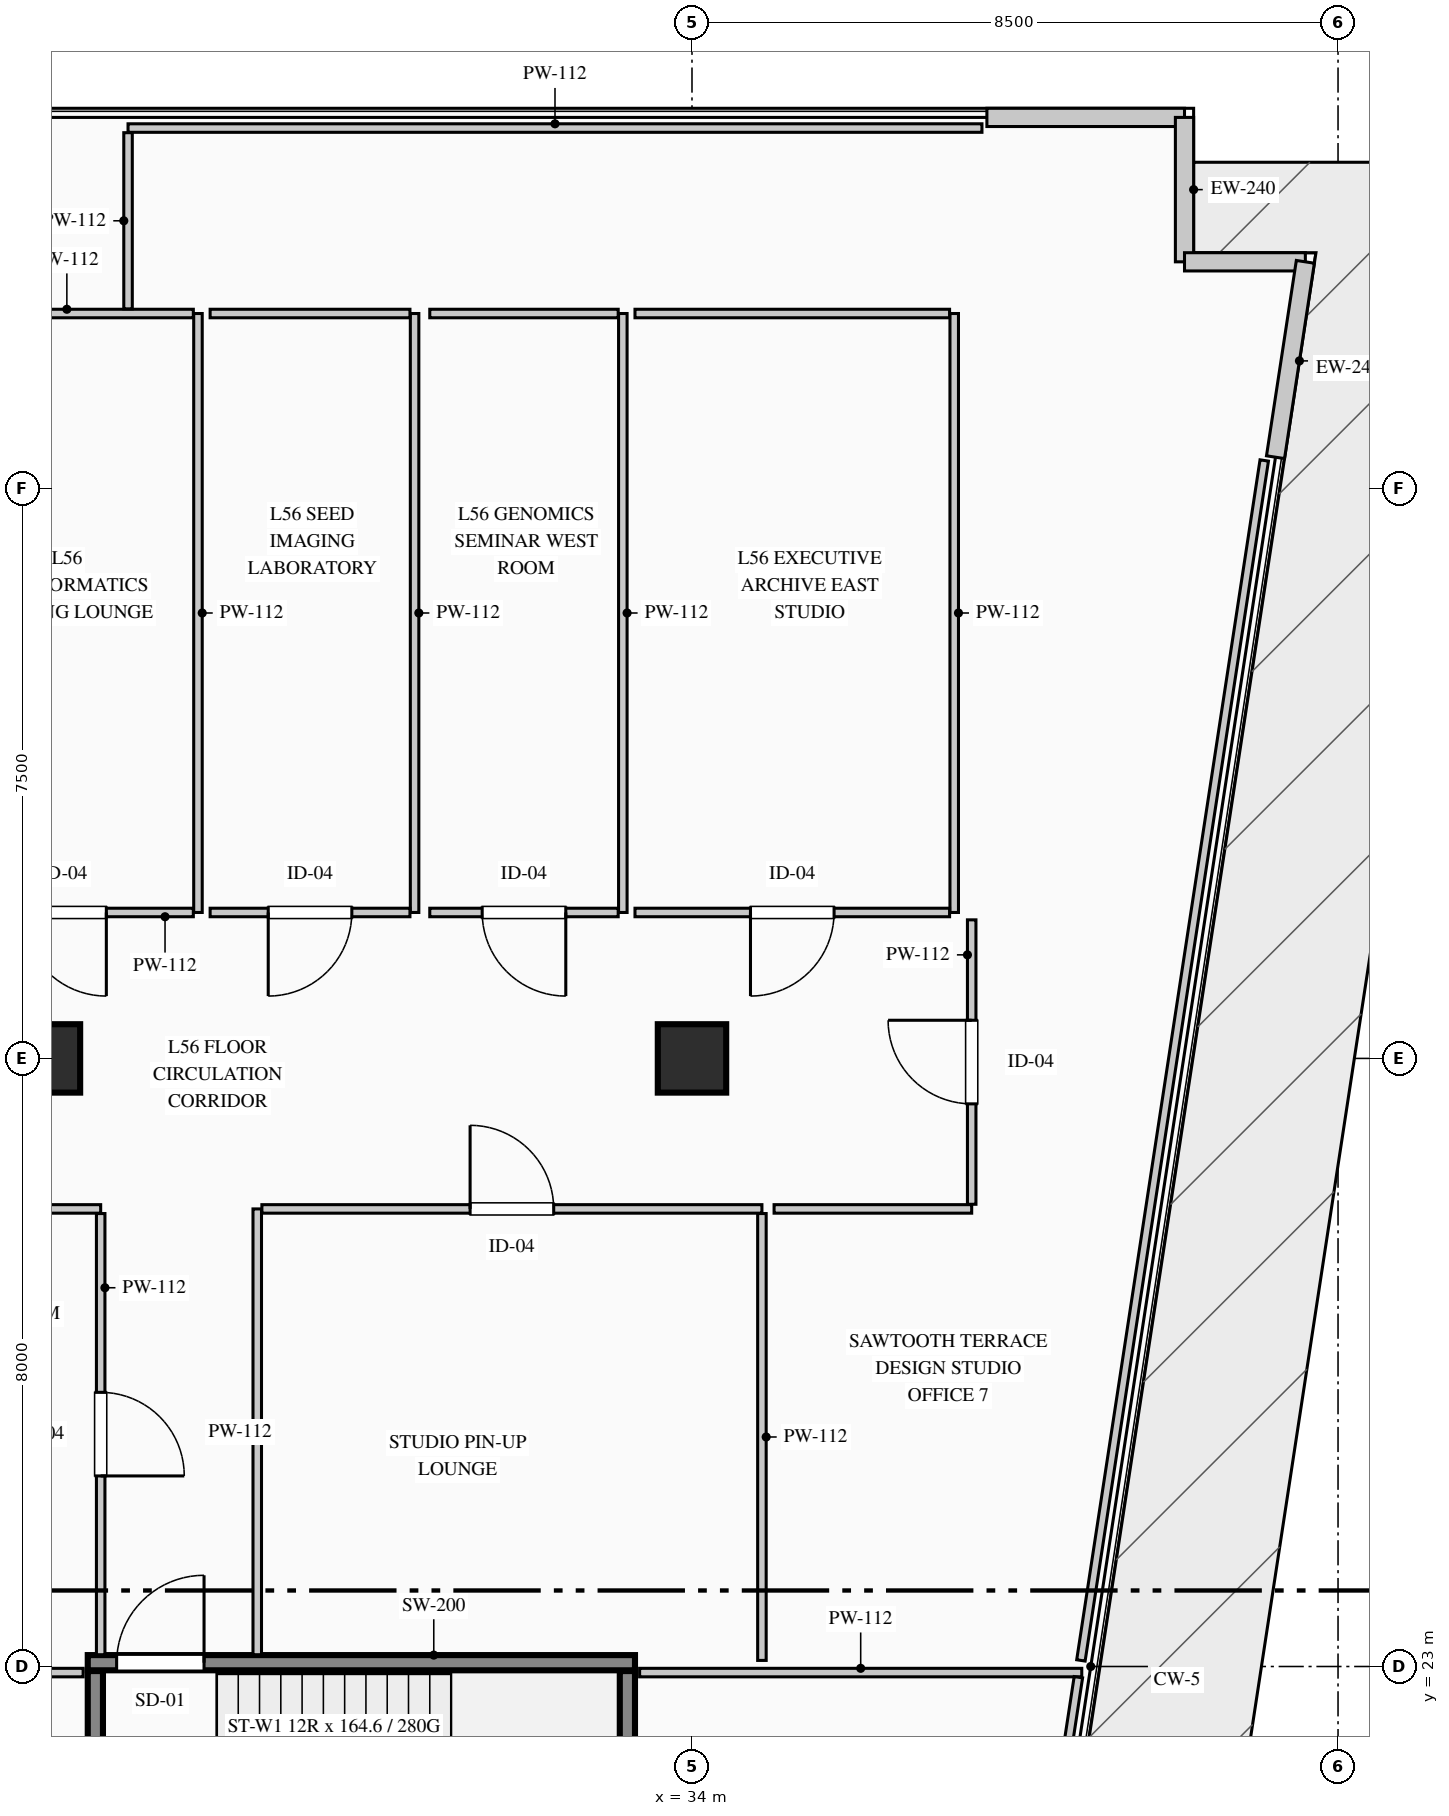
"""IFC4 building model, lengths in metres.
Left out: names, types, materials, properties, quantities, classifications, styles, units other than length and angle.
Written with IfcOpenShell. Run it as: python <this file> out.ifc"""

import sys

from ifc_helpers import new_model, si_unit, direction, frame, frame_2d, origin, origin_2d, place, context, subcontext, project, spatial, rectangle, extrude, element, fill, save


model = new_model("IFC4")
c1 = context("Model", 3, precision=1e-05, world=origin(), true_north=direction((0.0, 1.0)))
c2 = subcontext(c1, "Body", "Model", "MODEL_VIEW")
j1 = project(units=[si_unit("LENGTHUNIT", "METRE"), si_unit("PLANEANGLEUNIT", "RADIAN")], contexts=[c1])
p1 = place(None, origin())
s1 = spatial("IfcSite", under=j1, at=p1, CompositionType="ELEMENT")
p2 = place(p1, origin())
s2 = spatial("IfcBuilding", under=s1, at=p2, CompositionType="ELEMENT")
p3 = place(p2, frame((0.0, 0.0, 235.1)))
s3 = spatial("IfcBuildingStorey", under=s2, at=p3, CompositionType="ELEMENT", Elevation=235.1)
p4 = place(p3, frame((26.05, 23.05, 0.0), z_axis=(0.0, 0.0, 1.0), x_axis=(1.0, 0.0, 0.0)))
e1 = element("IfcWall", 1, at=p4, inside=s3, PredefinedType="SHEAR", context=c2, shape_type="SweptSolid", body=[
    extrude(rectangle(XDim=7.2, YDim=0.2, at=frame_2d((3.6, 0.0))), origin(), (0.0, 0.0, 1.0), 3.95),
])
p5 = place(p4, frame((0.38, 0.0, 0.0)))
e2 = element("IfcOpeningElement", 2, at=p5, cuts=e1, PredefinedType="OPENING", context=c2, shape_type="SweptSolid", body=[
    extrude(rectangle(XDim=1.15, YDim=2.2, at=frame_2d((0.575, 1.1))), frame((0.0, 0.11, 0.0), z_axis=(0.0, -1.0, 0.0), x_axis=(1.0, 0.0, 0.0)), (0.0, 0.0, 1.0), 0.22),
])
for number, where, z_axis, x_axis in (
    (3, (26.15, 19.81, 0.0), (0.0, 0.0, 1.0), (0.0, 1.0, 0.0)),
    (4, (33.15, 19.81, 0.0), (0.0, 0.0, 1.0), (0.0, 1.0, 0.0)),
):
    element("IfcWall", number, at=place(p3, frame(where, z_axis=z_axis, x_axis=x_axis)), inside=s3, PredefinedType="SHEAR", context=c2, shape_type="SweptSolid", body=[
        extrude(rectangle(XDim=3.13, YDim=0.2, at=frame_2d((1.565, 0.0))), origin(), (0.0, 0.0, 1.0), 3.95),
    ])
for number, where, z_axis, x_axis in (
    (5, (25.5, 31.0, 0.0), (0.0, 0.0, 1.0), (1.0, 0.0, 0.0)),
    (6, (34.0, 31.0, 0.0), (0.0, 0.0, 1.0), (1.0, 0.0, 0.0)),
):
    element("IfcColumn", number, at=place(p3, frame(where, z_axis=z_axis, x_axis=x_axis)), inside=s3, PredefinedType="COLUMN", context=c2, shape_type="SweptSolid", body=[
        extrude(rectangle(XDim=0.9, YDim=0.9, at=origin_2d()), origin(), (0.0, 0.0, 1.0), 3.95),
    ])
p6 = place(p3, frame((37.88, 43.38, 0.0), z_axis=(0.0, 0.0, 1.0), x_axis=(1.0, 0.0, 0.0)))
e7 = element("IfcWall", 7, at=p6, inside=s3, PredefinedType="STANDARD", context=c2, shape_type="SweptSolid", body=[
    extrude(rectangle(XDim=2.6, YDim=0.24, at=frame_2d((1.3, 0.0))), origin(), (0.0, 0.0, 1.0), 3.7),
])
p7 = place(p3, frame((40.48, 43.38, 0.0), z_axis=(0.0, 0.0, 1.0), x_axis=(0.0, -1.0, 0.0)))
e8 = element("IfcWall", 8, at=p7, inside=s3, PredefinedType="STANDARD", context=c2, shape_type="SweptSolid", body=[
    extrude(rectangle(XDim=1.9, YDim=0.24, at=frame_2d((0.95, 0.0))), origin(), (0.0, 0.0, 1.0), 3.7),
])
p8 = place(p3, frame((40.48, 41.48, 0.0), z_axis=(0.0, 0.0, 1.0), x_axis=(1.0, 0.0, 0.0)))
e9 = element("IfcWall", 9, at=p8, inside=s3, PredefinedType="STANDARD", context=c2, shape_type="SweptSolid", body=[
    extrude(rectangle(XDim=1.59, YDim=0.24, at=frame_2d((0.795, 0.0))), origin(), (0.0, 0.0, 1.0), 3.7),
])
p9 = place(p3, frame((42.07, 41.48, 0.0), z_axis=(0.0, 0.0, 1.0), x_axis=(-0.151090396132, -0.988519950328, 0.0)))
e10 = element("IfcWall", 10, at=p9, inside=s3, PredefinedType="STANDARD", context=c2, shape_type="SweptSolid", body=[
    extrude(rectangle(XDim=2.6, YDim=0.24, at=frame_2d((1.3, 0.0))), origin(), (0.0, 0.0, 1.0), 3.7),
])
p10 = place(p3, frame((27.5, 40.8, 0.0), z_axis=(0.0, 0.0, 1.0), x_axis=(0.0, -1.0, 0.0)))
e11 = element("IfcWall", 11, at=p10, inside=s3, PredefinedType="PARTITIONING", context=c2, shape_type="SweptSolid", body=[
    extrude(rectangle(XDim=7.88, YDim=0.112, at=frame_2d((3.94, 0.0))), origin(), (0.0, 0.0, 1.0), 3.7),
])
p11 = place(p3, frame((27.439, 32.92, 0.0), z_axis=(0.0, 0.0, 1.0), x_axis=(-1.0, 0.0, 0.0)))
e12 = element("IfcWall", 12, at=p11, inside=s3, PredefinedType="PARTITIONING", context=c2, shape_type="SweptSolid", body=[
    extrude(rectangle(XDim=3.389, YDim=0.112, at=frame_2d((1.694, 0.0))), origin(), (0.0, 0.0, 1.0), 3.7),
])
p12 = place(p11, frame((1.145, 0.0, 0.0)))
e13 = element("IfcOpeningElement", 13, at=p12, cuts=e12, PredefinedType="OPENING", context=c2, shape_type="SweptSolid", body=[
    extrude(rectangle(XDim=1.1, YDim=2.2, at=frame_2d((0.55, 1.1))), frame((0.0, 0.066, 0.0), z_axis=(0.0, -1.0, 0.0), x_axis=(1.0, 0.0, 0.0)), (0.0, 0.0, 1.0), 0.132),
])
p13 = place(p3, frame((24.111, 40.8, 0.0), z_axis=(0.0, 0.0, 1.0), x_axis=(1.0, 0.0, 0.0)))
e14 = element("IfcWall", 14, at=p13, inside=s3, PredefinedType="PARTITIONING", context=c2, shape_type="SweptSolid", body=[
    extrude(rectangle(XDim=3.328, YDim=0.112, at=frame_2d((1.664, 0.0))), origin(), (0.0, 0.0, 1.0), 3.7),
])
p14 = place(p3, frame((30.35, 40.8, 0.0), z_axis=(0.0, 0.0, 1.0), x_axis=(0.0, -1.0, 0.0)))
e15 = element("IfcWall", 15, at=p14, inside=s3, PredefinedType="PARTITIONING", context=c2, shape_type="SweptSolid", body=[
    extrude(rectangle(XDim=7.88, YDim=0.112, at=frame_2d((3.94, 0.0))), origin(), (0.0, 0.0, 1.0), 3.7),
])
p15 = place(p3, frame((30.289, 32.92, 0.0), z_axis=(0.0, 0.0, 1.0), x_axis=(-1.0, 0.0, 0.0)))
e16 = element("IfcWall", 16, at=p15, inside=s3, PredefinedType="PARTITIONING", context=c2, shape_type="SweptSolid", body=[
    extrude(rectangle(XDim=2.629, YDim=0.112, at=frame_2d((1.314, 0.0))), origin(), (0.0, 0.0, 1.0), 3.7),
])
p16 = place(p15, frame((0.764, 0.0, 0.0)))
e17 = element("IfcOpeningElement", 17, at=p16, cuts=e16, PredefinedType="OPENING", context=c2, shape_type="SweptSolid", body=[
    extrude(rectangle(XDim=1.1, YDim=2.2, at=frame_2d((0.55, 1.1))), frame((0.0, 0.066, 0.0), z_axis=(0.0, -1.0, 0.0), x_axis=(1.0, 0.0, 0.0)), (0.0, 0.0, 1.0), 0.132),
])
p17 = place(p3, frame((27.66, 40.8, 0.0), z_axis=(0.0, 0.0, 1.0), x_axis=(1.0, 0.0, 0.0)))
e18 = element("IfcWall", 18, at=p17, inside=s3, PredefinedType="PARTITIONING", context=c2, shape_type="SweptSolid", body=[
    extrude(rectangle(XDim=2.629, YDim=0.112, at=frame_2d((1.314, 0.0))), origin(), (0.0, 0.0, 1.0), 3.7),
])
p18 = place(p3, frame((33.09, 40.8, 0.0), z_axis=(0.0, 0.0, 1.0), x_axis=(0.0, -1.0, 0.0)))
e19 = element("IfcWall", 19, at=p18, inside=s3, PredefinedType="PARTITIONING", context=c2, shape_type="SweptSolid", body=[
    extrude(rectangle(XDim=7.88, YDim=0.112, at=frame_2d((3.94, 0.0))), origin(), (0.0, 0.0, 1.0), 3.7),
])
p19 = place(p3, frame((33.029, 32.92, 0.0), z_axis=(0.0, 0.0, 1.0), x_axis=(-1.0, 0.0, 0.0)))
e20 = element("IfcWall", 20, at=p19, inside=s3, PredefinedType="PARTITIONING", context=c2, shape_type="SweptSolid", body=[
    extrude(rectangle(XDim=2.479, YDim=0.112, at=frame_2d((1.24, 0.0))), origin(), (0.0, 0.0, 1.0), 3.7),
])
p20 = place(p19, frame((0.689, 0.0, 0.0)))
e21 = element("IfcOpeningElement", 21, at=p20, cuts=e20, PredefinedType="OPENING", context=c2, shape_type="SweptSolid", body=[
    extrude(rectangle(XDim=1.1, YDim=2.2, at=frame_2d((0.55, 1.1))), frame((0.0, 0.066, 0.0), z_axis=(0.0, -1.0, 0.0), x_axis=(1.0, 0.0, 0.0)), (0.0, 0.0, 1.0), 0.132),
])
p21 = place(p3, frame((30.55, 40.8, 0.0), z_axis=(0.0, 0.0, 1.0), x_axis=(1.0, 0.0, 0.0)))
e22 = element("IfcWall", 22, at=p21, inside=s3, PredefinedType="PARTITIONING", context=c2, shape_type="SweptSolid", body=[
    extrude(rectangle(XDim=2.479, YDim=0.112, at=frame_2d((1.24, 0.0))), origin(), (0.0, 0.0, 1.0), 3.7),
])
p22 = place(p3, frame((37.45, 40.8, 0.0), z_axis=(0.0, 0.0, 1.0), x_axis=(0.0, -1.0, 0.0)))
e23 = element("IfcWall", 23, at=p22, inside=s3, PredefinedType="PARTITIONING", context=c2, shape_type="SweptSolid", body=[
    extrude(rectangle(XDim=7.88, YDim=0.112, at=frame_2d((3.94, 0.0))), origin(), (0.0, 0.0, 1.0), 3.7),
])
p23 = place(p3, frame((37.389, 32.92, 0.0), z_axis=(0.0, 0.0, 1.0), x_axis=(-1.0, 0.0, 0.0)))
e24 = element("IfcWall", 24, at=p23, inside=s3, PredefinedType="PARTITIONING", context=c2, shape_type="SweptSolid", body=[
    extrude(rectangle(XDim=4.139, YDim=0.112, at=frame_2d((2.069, 0.0))), origin(), (0.0, 0.0, 1.0), 3.7),
])
p24 = place(p23, frame((1.52, 0.0, 0.0)))
e25 = element("IfcOpeningElement", 25, at=p24, cuts=e24, PredefinedType="OPENING", context=c2, shape_type="SweptSolid", body=[
    extrude(rectangle(XDim=1.1, YDim=2.2, at=frame_2d((0.55, 1.1))), frame((0.0, 0.066, 0.0), z_axis=(0.0, -1.0, 0.0), x_axis=(1.0, 0.0, 0.0)), (0.0, 0.0, 1.0), 0.132),
])
p25 = place(p3, frame((33.25, 40.8, 0.0), z_axis=(0.0, 0.0, 1.0), x_axis=(1.0, 0.0, 0.0)))
e26 = element("IfcWall", 26, at=p25, inside=s3, PredefinedType="PARTITIONING", context=c2, shape_type="SweptSolid", body=[
    extrude(rectangle(XDim=4.139, YDim=0.112, at=frame_2d((2.069, 0.0))), origin(), (0.0, 0.0, 1.0), 3.7),
])
p26 = place(p3, frame((33.311, 22.92, 0.0), z_axis=(0.0, 0.0, 1.0), x_axis=(1.0, 0.0, 0.0)))
e27 = element("IfcWall", 27, at=p26, inside=s3, PredefinedType="PARTITIONING", context=c2, shape_type="SweptSolid", body=[
    extrude(rectangle(XDim=5.817, YDim=0.112, at=frame_2d((2.909, 0.0))), origin(), (0.0, 0.0, 1.0), 3.7),
])
p27 = place(p3, frame((39.084, 22.859, 0.0), z_axis=(0.0, 0.0, 1.0), x_axis=(-0.151051087355, -0.988525957681, 0.0)))
e28 = element("IfcWall", 28, at=p27, inside=s3, PredefinedType="PARTITIONING", context=c2, shape_type="SweptSolid", body=[
    extrude(rectangle(XDim=15.865, YDim=0.112, at=frame_2d((7.933, 0.0))), origin(), (0.0, 0.0, 1.0), 3.7),
])
p28 = place(p3, frame((22.91, 22.92, 0.0), z_axis=(0.0, 0.0, 1.0), x_axis=(1.0, 0.0, 0.0)))
e29 = element("IfcWall", 29, at=p28, inside=s3, PredefinedType="PARTITIONING", context=c2, shape_type="SweptSolid", body=[
    extrude(rectangle(XDim=3.079, YDim=0.112, at=frame_2d((1.54, 0.0))), origin(), (0.0, 0.0, 1.0), 3.7),
])
p29 = place(p3, frame((22.91, 29.02, 0.0), z_axis=(0.0, 0.0, 1.0), x_axis=(1.0, 0.0, 0.0)))
e30 = element("IfcWall", 30, at=p29, inside=s3, PredefinedType="PARTITIONING", context=c2, shape_type="SweptSolid", body=[
    extrude(rectangle(XDim=3.31, YDim=0.112, at=frame_2d((1.655, 0.0))), origin(), (0.0, 0.0, 1.0), 3.485),
])
p30 = place(p3, frame((26.22, 28.959, 0.0), z_axis=(0.0, 0.0, 1.0), x_axis=(0.0, -1.0, 0.0)))
e31 = element("IfcWall", 31, at=p30, inside=s3, PredefinedType="PARTITIONING", context=c2, shape_type="SweptSolid", body=[
    extrude(rectangle(XDim=5.804, YDim=0.112, at=frame_2d((2.902, 0.0))), origin(), (0.0, 0.0, 1.0), 3.7),
])
p31 = place(p30, frame((2.352, 0.0, 0.0)))
e32 = element("IfcOpeningElement", 32, at=p31, cuts=e31, PredefinedType="OPENING", context=c2, shape_type="SweptSolid", body=[
    extrude(rectangle(XDim=1.1, YDim=2.2, at=frame_2d((0.55, 1.1))), frame((0.0, 0.066, 0.0), z_axis=(0.0, -1.0, 0.0), x_axis=(1.0, 0.0, 0.0)), (0.0, 0.0, 1.0), 0.132),
])
p32 = place(p3, frame((28.28, 23.155, 0.0), z_axis=(0.0, 0.0, 1.0), x_axis=(0.0, 1.0, 0.0)))
e33 = element("IfcWall", 33, at=p32, inside=s3, PredefinedType="PARTITIONING", context=c2, shape_type="SweptSolid", body=[
    extrude(rectangle(XDim=5.865, YDim=0.112, at=frame_2d((2.933, 0.0))), origin(), (0.0, 0.0, 1.0), 3.7),
])
p33 = place(p3, frame((28.341, 29.02, 0.0), z_axis=(0.0, 0.0, 1.0), x_axis=(1.0, 0.0, 0.0)))
e34 = element("IfcWall", 34, at=p33, inside=s3, PredefinedType="PARTITIONING", context=c2, shape_type="SweptSolid", body=[
    extrude(rectangle(XDim=6.579, YDim=0.112, at=frame_2d((3.29, 0.0))), origin(), (0.0, 0.0, 1.0), 3.485),
])
p34 = place(p33, frame((2.74, 0.0, 0.0)))
e35 = element("IfcOpeningElement", 35, at=p34, cuts=e34, PredefinedType="OPENING", context=c2, shape_type="SweptSolid", body=[
    extrude(rectangle(XDim=1.1, YDim=2.2, at=frame_2d((0.55, 1.1))), frame((0.0, 0.066, 0.0), z_axis=(0.0, -1.0, 0.0), x_axis=(1.0, 0.0, 0.0)), (0.0, 0.0, 1.0), 0.132),
])
p35 = place(p3, frame((34.92, 28.959, 0.0), z_axis=(0.0, 0.0, 1.0), x_axis=(0.0, -1.0, 0.0)))
e36 = element("IfcWall", 36, at=p35, inside=s3, PredefinedType="PARTITIONING", context=c2, shape_type="SweptSolid", body=[
    extrude(rectangle(XDim=5.879, YDim=0.112, at=frame_2d((2.939, 0.0))), origin(), (0.0, 0.0, 1.0), 3.7),
])
p36 = place(p3, frame((26.58, 43.24, 0.0), z_axis=(0.0, 0.0, 1.0), x_axis=(1.0, 0.0, 0.0)))
e37 = element("IfcWall", 37, at=p36, inside=s3, PredefinedType="PARTITIONING", context=c2, shape_type="SweptSolid", body=[
    extrude(rectangle(XDim=11.235, YDim=0.112, at=frame_2d((5.617, 0.0))), origin(), (0.0, 0.0, 1.0), 3.7),
])
p37 = place(p3, frame((41.529, 38.867, 0.0), z_axis=(0.0, 0.0, 1.0), x_axis=(-0.151041582551, -0.98852741001, 0.0)))
e38 = element("IfcWall", 38, at=p37, inside=s3, PredefinedType="PARTITIONING", context=c2, shape_type="SweptSolid", body=[
    extrude(rectangle(XDim=15.97, YDim=0.112, at=frame_2d((7.985, 0.0))), origin(), (0.0, 0.0, 1.0), 3.7),
])
p38 = place(p3, frame((35.08, 29.02, 0.0), z_axis=(0.0, 0.0, 1.0), x_axis=(1.0, 0.0, 0.0)))
e39 = element("IfcWall", 39, at=p38, inside=s3, PredefinedType="PARTITIONING", context=c2, shape_type="SweptSolid", body=[
    extrude(rectangle(XDim=2.6, YDim=0.112, at=frame_2d((1.3, 0.0))), origin(), (0.0, 0.0, 1.0), 3.7),
])
p39 = place(p3, frame((37.68, 29.081, 0.0), z_axis=(0.0, 0.0, 1.0), x_axis=(0.0, 1.0, 0.0)))
e40 = element("IfcWall", 40, at=p39, inside=s3, PredefinedType="PARTITIONING", context=c2, shape_type="SweptSolid", body=[
    extrude(rectangle(XDim=3.742, YDim=0.112, at=frame_2d((1.871, 0.0))), origin(), (0.0, 0.0, 1.0), 3.7),
])
p40 = place(p39, frame((1.321, 0.0, 0.0)))
e41 = element("IfcOpeningElement", 41, at=p40, cuts=e40, PredefinedType="OPENING", context=c2, shape_type="SweptSolid", body=[
    extrude(rectangle(XDim=1.1, YDim=2.2, at=frame_2d((0.55, 1.1))), frame((0.0, 0.066, 0.0), z_axis=(0.0, -1.0, 0.0), x_axis=(1.0, 0.0, 0.0)), (0.0, 0.0, 1.0), 0.132),
])
p41 = place(p3, frame((26.58, 40.861, 0.0), z_axis=(0.0, 0.0, 1.0), x_axis=(0.0, 1.0, 0.0)))
e42 = element("IfcWall", 42, at=p41, inside=s3, PredefinedType="PARTITIONING", context=c2, shape_type="SweptSolid", body=[
    extrude(rectangle(XDim=2.318, YDim=0.112, at=frame_2d((1.159, 0.0))), origin(), (0.0, 0.0, 1.0), 3.7),
])
p42 = place(p5, origin())
e43 = element("IfcDoor", 43, at=p42, inside=s3, OperationType="SINGLE_SWING_RIGHT", PredefinedType="DOOR", context=c2, shape_type="SweptSolid", body=[
    extrude(rectangle(XDim=1.15, YDim=2.2, at=frame_2d((0.575, 1.1))), frame((0.0, 0.025, 0.0), z_axis=(0.0, -1.0, 0.0), x_axis=(1.0, 0.0, 0.0)), (0.0, 0.0, 1.0), 0.05),
])
fill(e2, e43)
p43 = place(p12, origin())
e44 = element("IfcDoor", 44, at=p43, inside=s3, OperationType="SINGLE_SWING_LEFT", PredefinedType="DOOR", context=c2, shape_type="SweptSolid", body=[
    extrude(rectangle(XDim=1.1, YDim=2.2, at=frame_2d((0.55, 1.1))), frame((0.0, 0.025, 0.0), z_axis=(0.0, -1.0, 0.0), x_axis=(1.0, 0.0, 0.0)), (0.0, 0.0, 1.0), 0.05),
])
fill(e13, e44)
p44 = place(p16, origin())
e45 = element("IfcDoor", 45, at=p44, inside=s3, OperationType="SINGLE_SWING_RIGHT", PredefinedType="DOOR", context=c2, shape_type="SweptSolid", body=[
    extrude(rectangle(XDim=1.1, YDim=2.2, at=frame_2d((0.55, 1.1))), frame((0.0, 0.025, 0.0), z_axis=(0.0, -1.0, 0.0), x_axis=(1.0, 0.0, 0.0)), (0.0, 0.0, 1.0), 0.05),
])
fill(e17, e45)
p45 = place(p20, origin())
e46 = element("IfcDoor", 46, at=p45, inside=s3, OperationType="SINGLE_SWING_LEFT", PredefinedType="DOOR", context=c2, shape_type="SweptSolid", body=[
    extrude(rectangle(XDim=1.1, YDim=2.2, at=frame_2d((0.55, 1.1))), frame((0.0, 0.025, 0.0), z_axis=(0.0, -1.0, 0.0), x_axis=(1.0, 0.0, 0.0)), (0.0, 0.0, 1.0), 0.05),
])
fill(e21, e46)
p46 = place(p24, origin())
e47 = element("IfcDoor", 47, at=p46, inside=s3, OperationType="SINGLE_SWING_RIGHT", PredefinedType="DOOR", context=c2, shape_type="SweptSolid", body=[
    extrude(rectangle(XDim=1.1, YDim=2.2, at=frame_2d((0.55, 1.1))), frame((0.0, 0.025, 0.0), z_axis=(0.0, -1.0, 0.0), x_axis=(1.0, 0.0, 0.0)), (0.0, 0.0, 1.0), 0.05),
])
fill(e25, e47)
p47 = place(p31, origin())
e48 = element("IfcDoor", 48, at=p47, inside=s3, OperationType="SINGLE_SWING_RIGHT", PredefinedType="DOOR", context=c2, shape_type="SweptSolid", body=[
    extrude(rectangle(XDim=1.1, YDim=2.2, at=frame_2d((0.55, 1.1))), frame((0.0, 0.025, 0.0), z_axis=(0.0, -1.0, 0.0), x_axis=(1.0, 0.0, 0.0)), (0.0, 0.0, 1.0), 0.05),
])
fill(e32, e48)
p48 = place(p34, origin())
e49 = element("IfcDoor", 49, at=p48, inside=s3, OperationType="SINGLE_SWING_LEFT", PredefinedType="DOOR", context=c2, shape_type="SweptSolid", body=[
    extrude(rectangle(XDim=1.1, YDim=2.2, at=frame_2d((0.55, 1.1))), frame((0.0, 0.025, 0.0), z_axis=(0.0, -1.0, 0.0), x_axis=(1.0, 0.0, 0.0)), (0.0, 0.0, 1.0), 0.05),
])
fill(e35, e49)
p49 = place(p40, origin())
e50 = element("IfcDoor", 50, at=p49, inside=s3, OperationType="SINGLE_SWING_RIGHT", PredefinedType="DOOR", context=c2, shape_type="SweptSolid", body=[
    extrude(rectangle(XDim=1.1, YDim=2.2, at=frame_2d((0.55, 1.1))), frame((0.0, 0.025, 0.0), z_axis=(0.0, -1.0, 0.0), x_axis=(1.0, 0.0, 0.0)), (0.0, 0.0, 1.0), 0.05),
])
fill(e41, e50)
save(model, sys.argv[1])
